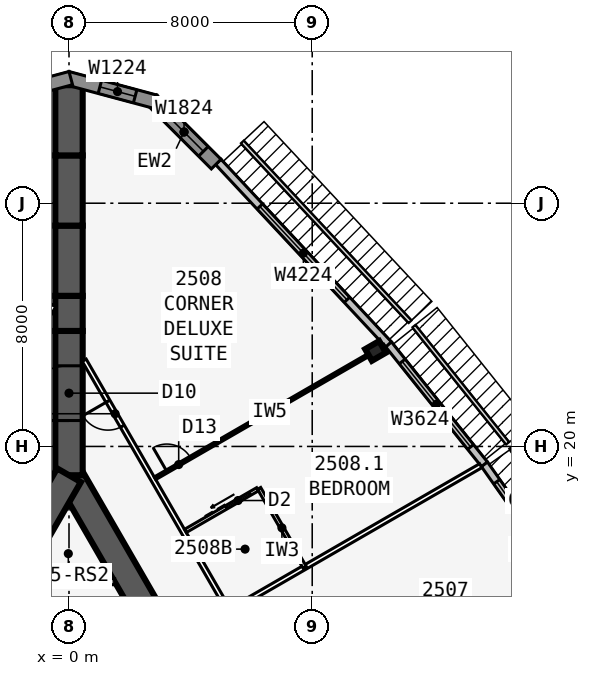
"""IFC4 building model, lengths in metres.
Left out: names, types, materials, properties, quantities, classifications, styles, units other than length and angle.
Written with IfcOpenShell. Run it as: python <this file> out.ifc"""

import sys

from ifc_helpers import new_model, si_unit, direction, frame, frame_2d, origin, origin_2d, place, context, subcontext, project, spatial, polyline, rectangle, i_section, outline, extrude, element, fill, save


model = new_model("IFC4")
c1 = context("Model", 3, precision=1e-05, world=origin(), true_north=direction((0.0, 1.0)))
c2 = subcontext(c1, "Body", "Model", "MODEL_VIEW")
j1 = project(units=[si_unit("LENGTHUNIT", "METRE"), si_unit("PLANEANGLEUNIT", "RADIAN")], contexts=[c1])
p1 = place(None, origin())
s1 = spatial("IfcSite", under=j1, at=p1, CompositionType="ELEMENT")
p2 = place(p1, origin())
s2 = spatial("IfcBuilding", under=s1, at=p2, CompositionType="ELEMENT")
p3 = place(p2, frame((0.0, 0.0, 96.5)))
s3 = spatial("IfcBuildingStorey", under=s2, at=p3, CompositionType="ELEMENT", Elevation=96.5)
p4 = place(p3, frame((16.5, -9.526, 0.0), z_axis=(0.0, 0.0, 1.0), x_axis=(-0.499999749417, 0.866025548458, 0.0)))
e1 = element("IfcWall", 1, at=p4, inside=s3, PredefinedType="SHEAR", context=c2, shape_type="SweptSolid", body=[
    extrude(rectangle(XDim=33.0, YDim=0.9, at=frame_2d((16.5, 0.0))), origin(), (0.0, 0.0, 1.0), 3.4),
])
p5 = place(p4, frame((14.15, 0.0, 0.0)))
e2 = element("IfcOpeningElement", 2, at=p5, cuts=e1, PredefinedType="OPENING", context=c2, shape_type="SweptSolid", body=[
    extrude(rectangle(XDim=1.8, YDim=2.13, at=frame_2d((0.9, 1.065))), frame((0.0, 0.46, 0.0), z_axis=(0.0, -1.0, 0.0), x_axis=(1.0, 0.0, 0.0)), (0.0, 0.0, 1.0), 0.92),
])
p6 = place(p4, frame((12.6, 0.0, 0.0)))
e3 = element("IfcOpeningElement", 3, at=p6, cuts=e1, PredefinedType="OPENING", context=c2, shape_type="SweptSolid", body=[
    extrude(rectangle(XDim=1.0, YDim=2.13, at=frame_2d((0.5, 1.065))), frame((0.0, 0.46, 0.0), z_axis=(0.0, -1.0, 0.0), x_axis=(1.0, 0.0, 0.0)), (0.0, 0.0, 1.0), 0.92),
])
p7 = place(p3, frame((0.0, 19.052, 0.0), z_axis=(0.0, 0.0, 1.0), x_axis=(-0.499999749417, -0.866025548458, 0.0)))
e4 = element("IfcWall", 4, at=p7, inside=s3, PredefinedType="SHEAR", context=c2, shape_type="SweptSolid", body=[
    extrude(rectangle(XDim=33.0, YDim=0.9, at=frame_2d((16.5, 0.0))), origin(), (0.0, 0.0, 1.0), 3.4),
])
p8 = place(p7, frame((14.15, 0.0, 0.0)))
e5 = element("IfcOpeningElement", 5, at=p8, cuts=e4, PredefinedType="OPENING", context=c2, shape_type="SweptSolid", body=[
    extrude(rectangle(XDim=1.8, YDim=2.13, at=frame_2d((0.9, 1.065))), frame((0.0, 0.46, 0.0), z_axis=(0.0, -1.0, 0.0), x_axis=(1.0, 0.0, 0.0)), (0.0, 0.0, 1.0), 0.92),
])
p9 = place(p7, frame((12.6, 0.0, 0.0)))
e6 = element("IfcOpeningElement", 6, at=p9, cuts=e4, PredefinedType="OPENING", context=c2, shape_type="SweptSolid", body=[
    extrude(rectangle(XDim=1.0, YDim=2.13, at=frame_2d((0.5, 1.065))), frame((0.0, 0.46, 0.0), z_axis=(0.0, -1.0, 0.0), x_axis=(1.0, 0.0, 0.0)), (0.0, 0.0, 1.0), 0.92),
])
p10 = place(p3, frame((0.0, 19.052, 0.0), z_axis=(0.0, 0.0, 1.0), x_axis=(0.0, 1.0, 0.0)))
e7 = element("IfcWall", 7, at=p10, inside=s3, PredefinedType="SHEAR", context=c2, shape_type="SweptSolid", body=[
    extrude(rectangle(XDim=4.746, YDim=0.9, at=frame_2d((2.373, 0.0))), origin(), (0.0, 0.0, 1.0), 3.4),
])
p11 = place(p10, frame((1.8, 0.0, 0.0)))
e8 = element("IfcOpeningElement", 8, at=p11, cuts=e7, PredefinedType="OPENING", context=c2, shape_type="SweptSolid", body=[
    extrude(rectangle(XDim=1.8, YDim=2.13, at=frame_2d((0.9, 1.065))), frame((0.0, 0.46, 0.0), z_axis=(0.0, -1.0, 0.0), x_axis=(1.0, 0.0, 0.0)), (0.0, 0.0, 1.0), 0.92),
])
p12 = place(p3, frame((0.0, 23.799, 0.0), z_axis=(0.0, 0.0, 1.0), x_axis=(0.0, 1.0, 0.0)))
e9 = element("IfcWall", 9, at=p12, inside=s3, PredefinedType="SHEAR", context=c2, shape_type="SweptSolid", body=[
    extrude(rectangle(XDim=1.155, YDim=0.9, at=frame_2d((0.577, 0.0))), origin(), (0.0, 0.0, 1.0), 3.4),
])
p13 = place(p3, frame((0.0, 24.953, 0.0), z_axis=(0.0, 0.0, 1.0), x_axis=(0.0, 1.0, 0.0)))
e10 = element("IfcWall", 10, at=p13, inside=s3, PredefinedType="SHEAR", context=c2, shape_type="SweptSolid", body=[
    extrude(rectangle(XDim=2.309, YDim=0.9, at=frame_2d((1.155, 0.0))), origin(), (0.0, 0.0, 1.0), 3.4),
])
p14 = place(p3, frame((0.0, 27.263, 0.0), z_axis=(0.0, 0.0, 1.0), x_axis=(0.0, 1.0, 0.0)))
e11 = element("IfcWall", 11, at=p14, inside=s3, PredefinedType="SHEAR", context=c2, shape_type="SweptSolid", body=[
    extrude(rectangle(XDim=2.31, YDim=0.9, at=frame_2d((1.155, 0.0))), origin(), (0.0, 0.0, 1.0), 3.4),
])
p15 = place(p3, frame((0.0, 29.572, 0.0), z_axis=(0.0, 0.0, 1.0), x_axis=(0.0, 1.0, 0.0)))
e12 = element("IfcWall", 12, at=p15, inside=s3, PredefinedType="SHEAR", context=c2, shape_type="SweptSolid", body=[
    extrude(rectangle(XDim=2.309, YDim=0.9, at=frame_2d((1.155, 0.0))), origin(), (0.0, 0.0, 1.0), 3.4),
])
p16 = place(p3, frame((10.083, 23.142, 0.0), z_axis=(0.0, 0.0, 1.0), x_axis=(-0.5, 0.866025403784, 0.0)))
e13 = element("IfcColumn", 13, at=p16, inside=s3, PredefinedType="COLUMN", context=c2, shape_type="SweptSolid", body=[
    extrude(i_section(OverallWidth=0.442, OverallDepth=0.531, WebThickness=0.066, FlangeThickness=0.106, at=origin_2d()), origin(), (0.0, 0.0, 1.0), 3.4),
])
p17 = place(p3, frame((16.555, 15.318, 0.0), z_axis=(0.0, 0.0, 1.0), x_axis=(-0.5766431066, 0.81699616132, 0.0)))
e14 = element("IfcWall", 14, at=p17, inside=s3, PredefinedType="STANDARD", context=c2, shape_type="SweptSolid", body=[
    extrude(rectangle(XDim=5.021, YDim=0.25, at=frame_2d((2.51, 0.0))), origin(), (0.0, 0.0, 1.0), 3.235),
])
p18 = place(p17, frame((0.71, 0.0, 0.45)))
e15 = element("IfcOpeningElement", 15, at=p18, cuts=e14, PredefinedType="OPENING", context=c2, shape_type="SweptSolid", body=[
    extrude(rectangle(XDim=3.6, YDim=2.4, at=frame_2d((1.8, 1.2))), frame((0.0, 0.135, 0.0), z_axis=(0.0, -1.0, 0.0), x_axis=(1.0, 0.0, 0.0)), (0.0, 0.0, 1.0), 0.27),
])
p19 = place(p3, frame((13.664, 19.414, 0.0), z_axis=(0.0, 0.0, 1.0), x_axis=(-0.624594965756, 0.780948864364, 0.0)))
e16 = element("IfcWall", 16, at=p19, inside=s3, PredefinedType="STANDARD", context=c2, shape_type="SweptSolid", body=[
    extrude(rectangle(XDim=5.058, YDim=0.25, at=frame_2d((2.529, 0.0))), origin(), (0.0, 0.0, 1.0), 3.235),
])
p20 = place(p19, frame((0.729, 0.0, 0.45)))
e17 = element("IfcOpeningElement", 17, at=p20, cuts=e16, PredefinedType="OPENING", context=c2, shape_type="SweptSolid", body=[
    extrude(rectangle(XDim=3.6, YDim=2.4, at=frame_2d((1.8, 1.2))), frame((0.0, 0.135, 0.0), z_axis=(0.0, -1.0, 0.0), x_axis=(1.0, 0.0, 0.0)), (0.0, 0.0, 1.0), 0.27),
])
p21 = place(p3, frame((10.511, 23.357, 0.0), z_axis=(0.0, 0.0, 1.0), x_axis=(-0.682289646561, 0.731081964075, 0.0)))
e18 = element("IfcWall", 18, at=p21, inside=s3, PredefinedType="STANDARD", context=c2, shape_type="SweptSolid", body=[
    extrude(rectangle(XDim=8.211, YDim=0.25, at=frame_2d((4.105, 0.0))), origin(), (0.0, 0.0, 1.0), 3.235),
])
p22 = place(p21, frame((2.006, 0.0, 0.45)))
e19 = element("IfcOpeningElement", 19, at=p22, cuts=e18, PredefinedType="OPENING", context=c2, shape_type="SweptSolid", body=[
    extrude(rectangle(XDim=4.2, YDim=2.4, at=frame_2d((2.1, 1.2))), frame((0.0, 0.135, 0.0), z_axis=(0.0, -1.0, 0.0), x_axis=(1.0, 0.0, 0.0)), (0.0, 0.0, 1.0), 0.27),
])
p23 = place(p3, frame((4.841, 29.286, 0.0), z_axis=(0.0, 0.0, 1.0), x_axis=(-0.707106781187, 0.707106781187, 0.0)))
e20 = element("IfcWall", 20, at=p23, inside=s3, PredefinedType="SOLIDWALL", context=c2, shape_type="SweptSolid", body=[
    extrude(rectangle(XDim=2.988, YDim=0.45, at=frame_2d((1.494, 0.0))), origin(), (0.0, 0.0, 1.0), 3.235),
])
p24 = place(p23, frame((0.594, 0.0, 0.45)))
e21 = element("IfcOpeningElement", 21, at=p24, cuts=e20, PredefinedType="OPENING", context=c2, shape_type="SweptSolid", body=[
    extrude(rectangle(XDim=1.8, YDim=2.4, at=frame_2d((0.9, 1.2))), frame((0.0, 0.235, 0.0), z_axis=(0.0, -1.0, 0.0), x_axis=(1.0, 0.0, 0.0)), (0.0, 0.0, 1.0), 0.47),
])
p25 = place(p3, frame((2.829, 31.341, 0.0), z_axis=(0.0, 0.0, 1.0), x_axis=(-0.965930548995, 0.258801419081, 0.0)))
e22 = element("IfcWall", 22, at=p25, inside=s3, PredefinedType="SOLIDWALL", context=c2, shape_type="SweptSolid", body=[
    extrude(outline(polyline([(2.989, 0.225), (2.929, 0.225), (2.438, 0.093), (2.402, 0.225), (0.0, 0.225), (0.0, -0.225), (2.989, -0.225), (2.989, 0.225)])), origin(), (0.0, 0.0, 1.0), 3.235),
])
p26 = place(p25, frame((0.676, 0.0, 0.45)))
e23 = element("IfcOpeningElement", 23, at=p26, cuts=e22, PredefinedType="OPENING", context=c2, shape_type="SweptSolid", body=[
    extrude(rectangle(XDim=1.2, YDim=2.4, at=frame_2d((0.6, 1.2))), frame((0.0, 0.235, 0.0), z_axis=(0.0, -1.0, 0.0), x_axis=(1.0, 0.0, 0.0)), (0.0, 0.0, 1.0), 0.47),
])
p27 = place(p3, frame((0.058, 32.114, 0.0), z_axis=(0.0, 0.0, 1.0), x_axis=(-0.965930548995, -0.258801419081, 0.0)))
e24 = element("IfcWall", 24, at=p27, inside=s3, PredefinedType="SOLIDWALL", context=c2, shape_type="SweptSolid", body=[
    extrude(outline(polyline([(2.989, 0.225), (0.586, 0.225), (0.551, 0.093), (0.059, 0.225), (0.0, 0.225), (0.0, -0.225), (2.989, -0.225), (2.989, 0.225)])), origin(), (0.0, 0.0, 1.0), 3.235),
])
p28 = place(p27, frame((1.113, 0.0, 0.45)))
e25 = element("IfcOpeningElement", 25, at=p28, cuts=e24, PredefinedType="OPENING", context=c2, shape_type="SweptSolid", body=[
    extrude(rectangle(XDim=1.2, YDim=2.4, at=frame_2d((0.6, 1.2))), frame((0.0, 0.235, 0.0), z_axis=(0.0, -1.0, 0.0), x_axis=(1.0, 0.0, 0.0)), (0.0, 0.0, 1.0), 0.47),
])
p29 = place(p3, frame((20.027, -10.985, 0.0), z_axis=(0.0, 0.0, 1.0), x_axis=(-0.500001677587, 0.866024435227, 0.0)))
e26 = element("IfcWall", 26, at=p29, inside=s3, PredefinedType="PARTITIONING", context=c2, shape_type="SweptSolid", body=[
    extrude(rectangle(XDim=39.054, YDim=0.15, at=frame_2d((19.527, 0.0))), origin(), (0.0, 0.0, 1.0), 3.235),
])
p30 = place(p29, frame((1.558, 0.0, 0.0)))
e27 = element("IfcOpeningElement", 27, at=p30, cuts=e26, PredefinedType="OPENING", context=c2, shape_type="SweptSolid", body=[
    extrude(rectangle(XDim=0.95, YDim=2.13, at=frame_2d((0.475, 1.065))), frame((0.0, 0.085, 0.0), z_axis=(0.0, -1.0, 0.0), x_axis=(1.0, 0.0, 0.0)), (0.0, 0.0, 1.0), 0.17),
])
p31 = place(p29, frame((11.552, 0.0, 0.0)))
e28 = element("IfcOpeningElement", 28, at=p31, cuts=e26, PredefinedType="OPENING", context=c2, shape_type="SweptSolid", body=[
    extrude(rectangle(XDim=0.95, YDim=2.13, at=frame_2d((0.475, 1.065))), frame((0.0, 0.085, 0.0), z_axis=(0.0, -1.0, 0.0), x_axis=(1.0, 0.0, 0.0)), (0.0, 0.0, 1.0), 0.17),
])
p32 = place(p29, frame((22.752, 0.0, 0.0)))
e29 = element("IfcOpeningElement", 29, at=p32, cuts=e26, PredefinedType="OPENING", context=c2, shape_type="SweptSolid", body=[
    extrude(rectangle(XDim=0.95, YDim=2.13, at=frame_2d((0.475, 1.065))), frame((0.0, 0.085, 0.0), z_axis=(0.0, -1.0, 0.0), x_axis=(1.0, 0.0, 0.0)), (0.0, 0.0, 1.0), 0.17),
])
p33 = place(p29, frame((36.546, 0.0, 0.0)))
e30 = element("IfcOpeningElement", 30, at=p33, cuts=e26, PredefinedType="OPENING", context=c2, shape_type="SweptSolid", body=[
    extrude(rectangle(XDim=0.95, YDim=2.13, at=frame_2d((0.475, 1.065))), frame((0.0, 0.085, 0.0), z_axis=(0.0, -1.0, 0.0), x_axis=(1.0, 0.0, 0.0)), (0.0, 0.0, 1.0), 0.17),
])
p34 = place(p3, frame((5.329, 14.623, 0.0), z_axis=(0.0, 0.0, 1.0), x_axis=(0.866018409083, 0.500012114982, 0.0)))
e31 = element("IfcWall", 31, at=p34, inside=s3, PredefinedType="PARTITIONING", context=c2, shape_type="SweptSolid", body=[
    extrude(rectangle(XDim=9.485, YDim=0.15, at=frame_2d((4.742, 0.0))), origin(), (0.0, 0.0, 1.0), 2.389),
])
p35 = place(p3, frame((2.829, 18.954, 0.0), z_axis=(0.0, 0.0, 1.0), x_axis=(0.866020536561, 0.500008430184, 0.0)))
e32 = element("IfcWall", 32, at=p35, inside=s3, PredefinedType="PARTITIONING", context=c2, shape_type="SweptSolid", body=[
    extrude(rectangle(XDim=8.72, YDim=0.1, at=frame_2d((4.36, 0.0))), origin(), (0.0, 0.0, 1.0), 2.389),
])
p36 = place(p35, frame((0.45, 0.0, 0.0)))
e33 = element("IfcOpeningElement", 33, at=p36, cuts=e32, PredefinedType="OPENING", context=c2, shape_type="SweptSolid", body=[
    extrude(rectangle(XDim=0.9, YDim=2.13, at=frame_2d((0.45, 1.065))), frame((0.0, 0.06, 0.0), z_axis=(0.0, -1.0, 0.0), x_axis=(1.0, 0.0, 0.0)), (0.0, 0.0, 1.0), 0.12),
])
p37 = place(p3, frame((7.753, 16.023, 0.0), z_axis=(0.0, 0.0, 1.0), x_axis=(-0.499990139034, 0.866031096941, 0.0)))
e34 = element("IfcWall", 34, at=p37, inside=s3, PredefinedType="PLUMBINGWALL", context=c2, shape_type="SweptSolid", body=[
    extrude(rectangle(XDim=3.0, YDim=0.12, at=frame_2d((1.5, 0.0))), origin(), (0.0, 0.0, 1.0), 3.235),
])
p38 = place(p3, frame((3.829, 17.221, 0.0), z_axis=(0.0, 0.0, 1.0), x_axis=(0.865997131366, 0.500048966069, 0.0)))
e35 = element("IfcWall", 35, at=p38, inside=s3, PredefinedType="PLUMBINGWALL", context=c2, shape_type="SweptSolid", body=[
    extrude(rectangle(XDim=2.74, YDim=0.12, at=frame_2d((1.37, 0.0))), origin(), (0.0, 0.0, 1.0), 3.235),
])
p39 = place(p38, frame((1.55, 0.0, 0.0)))
e36 = element("IfcOpeningElement", 36, at=p39, cuts=e35, PredefinedType="OPENING", context=c2, shape_type="SweptSolid", body=[
    extrude(rectangle(XDim=0.9, YDim=2.13, at=frame_2d((0.45, 1.065))), frame((0.0, 0.07, 0.0), z_axis=(0.0, -1.0, 0.0), x_axis=(1.0, 0.0, 0.0)), (0.0, 0.0, 1.0), 0.14),
])
p40 = place(p3, frame((-0.5, 24.636, 0.0), z_axis=(0.0, 0.0, 1.0), x_axis=(-0.500001915564, -0.86602429783, 0.0)))
e37 = element("IfcWall", 37, at=p40, inside=s3, PredefinedType="PARTITIONING", context=c2, shape_type="SweptSolid", body=[
    extrude(rectangle(XDim=42.172, YDim=0.15, at=frame_2d((21.086, 0.0))), origin(), (0.0, 0.0, 1.0), 3.235),
])
p41 = place(p40, frame((1.911, 0.0, 0.0)))
e38 = element("IfcOpeningElement", 38, at=p41, cuts=e37, PredefinedType="OPENING", context=c2, shape_type="SweptSolid", body=[
    extrude(rectangle(XDim=0.95, YDim=2.13, at=frame_2d((0.475, 1.065))), frame((0.0, 0.085, 0.0), z_axis=(0.0, -1.0, 0.0), x_axis=(1.0, 0.0, 0.0)), (0.0, 0.0, 1.0), 0.17),
])
p42 = place(p40, frame((8.111, 0.0, 0.0)))
e39 = element("IfcOpeningElement", 39, at=p42, cuts=e37, PredefinedType="OPENING", context=c2, shape_type="SweptSolid", body=[
    extrude(rectangle(XDim=0.95, YDim=2.13, at=frame_2d((0.475, 1.065))), frame((0.0, 0.085, 0.0), z_axis=(0.0, -1.0, 0.0), x_axis=(1.0, 0.0, 0.0)), (0.0, 0.0, 1.0), 0.17),
])
p43 = place(p40, frame((18.111, 0.0, 0.0)))
e40 = element("IfcOpeningElement", 40, at=p43, cuts=e37, PredefinedType="OPENING", context=c2, shape_type="SweptSolid", body=[
    extrude(rectangle(XDim=0.95, YDim=2.13, at=frame_2d((0.475, 1.065))), frame((0.0, 0.085, 0.0), z_axis=(0.0, -1.0, 0.0), x_axis=(1.0, 0.0, 0.0)), (0.0, 0.0, 1.0), 0.17),
])
p44 = place(p40, frame((28.711, 0.0, 0.0)))
e41 = element("IfcOpeningElement", 41, at=p44, cuts=e37, PredefinedType="OPENING", context=c2, shape_type="SweptSolid", body=[
    extrude(rectangle(XDim=0.95, YDim=2.13, at=frame_2d((0.475, 1.065))), frame((0.0, 0.085, 0.0), z_axis=(0.0, -1.0, 0.0), x_axis=(1.0, 0.0, 0.0)), (0.0, 0.0, 1.0), 0.17),
])
p45 = place(p40, frame((33.711, 0.0, 0.0)))
e42 = element("IfcOpeningElement", 42, at=p45, cuts=e37, PredefinedType="OPENING", context=c2, shape_type="SweptSolid", body=[
    extrude(rectangle(XDim=0.95, YDim=2.13, at=frame_2d((0.475, 1.065))), frame((0.0, 0.085, 0.0), z_axis=(0.0, -1.0, 0.0), x_axis=(1.0, 0.0, 0.0)), (0.0, 0.0, 1.0), 0.17),
])
p46 = place(p40, frame((39.311, 0.0, 0.0)))
e43 = element("IfcOpeningElement", 43, at=p46, cuts=e37, PredefinedType="OPENING", context=c2, shape_type="SweptSolid", body=[
    extrude(rectangle(XDim=0.95, YDim=2.13, at=frame_2d((0.475, 1.065))), frame((0.0, 0.085, 0.0), z_axis=(0.0, -1.0, 0.0), x_axis=(1.0, 0.0, 0.0)), (0.0, 0.0, 1.0), 0.17),
])
p47 = place(p3, frame((-1.501, 15.552, 0.0), z_axis=(0.0, 0.0, 1.0), x_axis=(1.0, 0.0, 0.0)))
e44 = element("IfcWall", 44, at=p47, inside=s3, PredefinedType="SOLIDWALL", context=c2, shape_type="SweptSolid", body=[
    extrude(rectangle(XDim=3.002, YDim=0.2, at=frame_2d((1.501, 0.0))), origin(), (0.0, 0.0, 1.0), 3.235),
])
p48 = place(p18, origin())
e45 = element("IfcWindow", 45, at=p48, inside=s3, PartitioningType="SINGLE_PANEL", PredefinedType="WINDOW", context=c2, shape_type="SweptSolid", body=[
    extrude(rectangle(XDim=3.6, YDim=2.4, at=frame_2d((1.8, 1.2))), frame((0.0, 0.03, 0.0), z_axis=(0.0, -1.0, 0.0), x_axis=(1.0, 0.0, 0.0)), (0.0, 0.0, 1.0), 0.06),
])
fill(e15, e45)
p49 = place(p20, origin())
e46 = element("IfcWindow", 46, at=p49, inside=s3, PartitioningType="SINGLE_PANEL", PredefinedType="WINDOW", context=c2, shape_type="SweptSolid", body=[
    extrude(rectangle(XDim=3.6, YDim=2.4, at=frame_2d((1.8, 1.2))), frame((0.0, 0.03, 0.0), z_axis=(0.0, -1.0, 0.0), x_axis=(1.0, 0.0, 0.0)), (0.0, 0.0, 1.0), 0.06),
])
fill(e17, e46)
p50 = place(p22, origin())
e47 = element("IfcWindow", 47, at=p50, inside=s3, PartitioningType="SINGLE_PANEL", PredefinedType="WINDOW", context=c2, shape_type="SweptSolid", body=[
    extrude(rectangle(XDim=4.2, YDim=2.4, at=frame_2d((2.1, 1.2))), frame((0.0, 0.03, 0.0), z_axis=(0.0, -1.0, 0.0), x_axis=(1.0, 0.0, 0.0)), (0.0, 0.0, 1.0), 0.06),
])
fill(e19, e47)
p51 = place(p24, origin())
e48 = element("IfcWindow", 48, at=p51, inside=s3, PartitioningType="SINGLE_PANEL", PredefinedType="WINDOW", context=c2, shape_type="SweptSolid", body=[
    extrude(rectangle(XDim=1.8, YDim=2.4, at=frame_2d((0.9, 1.2))), frame((0.0, 0.03, 0.0), z_axis=(0.0, -1.0, 0.0), x_axis=(1.0, 0.0, 0.0)), (0.0, 0.0, 1.0), 0.06),
])
fill(e21, e48)
p52 = place(p26, origin())
e49 = element("IfcWindow", 49, at=p52, inside=s3, PartitioningType="SINGLE_PANEL", PredefinedType="WINDOW", context=c2, shape_type="SweptSolid", body=[
    extrude(rectangle(XDim=1.2, YDim=2.4, at=frame_2d((0.6, 1.2))), frame((0.0, 0.03, 0.0), z_axis=(0.0, -1.0, 0.0), x_axis=(1.0, 0.0, 0.0)), (0.0, 0.0, 1.0), 0.06),
])
fill(e23, e49)
p53 = place(p36, origin())
e50 = element("IfcDoor", 50, at=p53, inside=s3, OperationType="SINGLE_SWING_LEFT", PredefinedType="DOOR", context=c2, shape_type="SweptSolid", body=[
    extrude(rectangle(XDim=0.9, YDim=2.13, at=frame_2d((0.45, 1.065))), frame((0.0, 0.025, 0.0), z_axis=(0.0, -1.0, 0.0), x_axis=(1.0, 0.0, 0.0)), (0.0, 0.0, 1.0), 0.05),
])
fill(e33, e50)
p54 = place(p39, origin())
e51 = element("IfcDoor", 51, at=p54, inside=s3, OperationType="SLIDING_TO_LEFT", PredefinedType="DOOR", context=c2, shape_type="SweptSolid", body=[
    extrude(rectangle(XDim=0.9, YDim=2.13, at=frame_2d((0.45, 1.065))), frame((0.0, 0.025, 0.0), z_axis=(0.0, -1.0, 0.0), x_axis=(1.0, 0.0, 0.0)), (0.0, 0.0, 1.0), 0.05),
])
fill(e36, e51)
p55 = place(p33, origin())
e52 = element("IfcDoor", 52, at=p55, inside=s3, OperationType="SINGLE_SWING_RIGHT", PredefinedType="DOOR", context=c2, shape_type="SweptSolid", body=[
    extrude(rectangle(XDim=0.95, YDim=2.13, at=frame_2d((0.475, 1.065))), frame((0.0, 0.025, 0.0), z_axis=(0.0, -1.0, 0.0), x_axis=(1.0, 0.0, 0.0)), (0.0, 0.0, 1.0), 0.05),
])
fill(e30, e52)
p56 = place(p11, origin())
e53 = element("IfcDoor", 53, at=p56, inside=s3, OperationType="DOUBLE_DOOR_DOUBLE_SWING", PredefinedType="DOOR", context=c2, shape_type="SweptSolid", body=[
    extrude(rectangle(XDim=1.8, YDim=2.13, at=frame_2d((0.9, 1.065))), frame((0.0, 0.025, 0.0), z_axis=(0.0, -1.0, 0.0), x_axis=(1.0, 0.0, 0.0)), (0.0, 0.0, 1.0), 0.05),
])
fill(e8, e53)
save(model, sys.argv[1])
